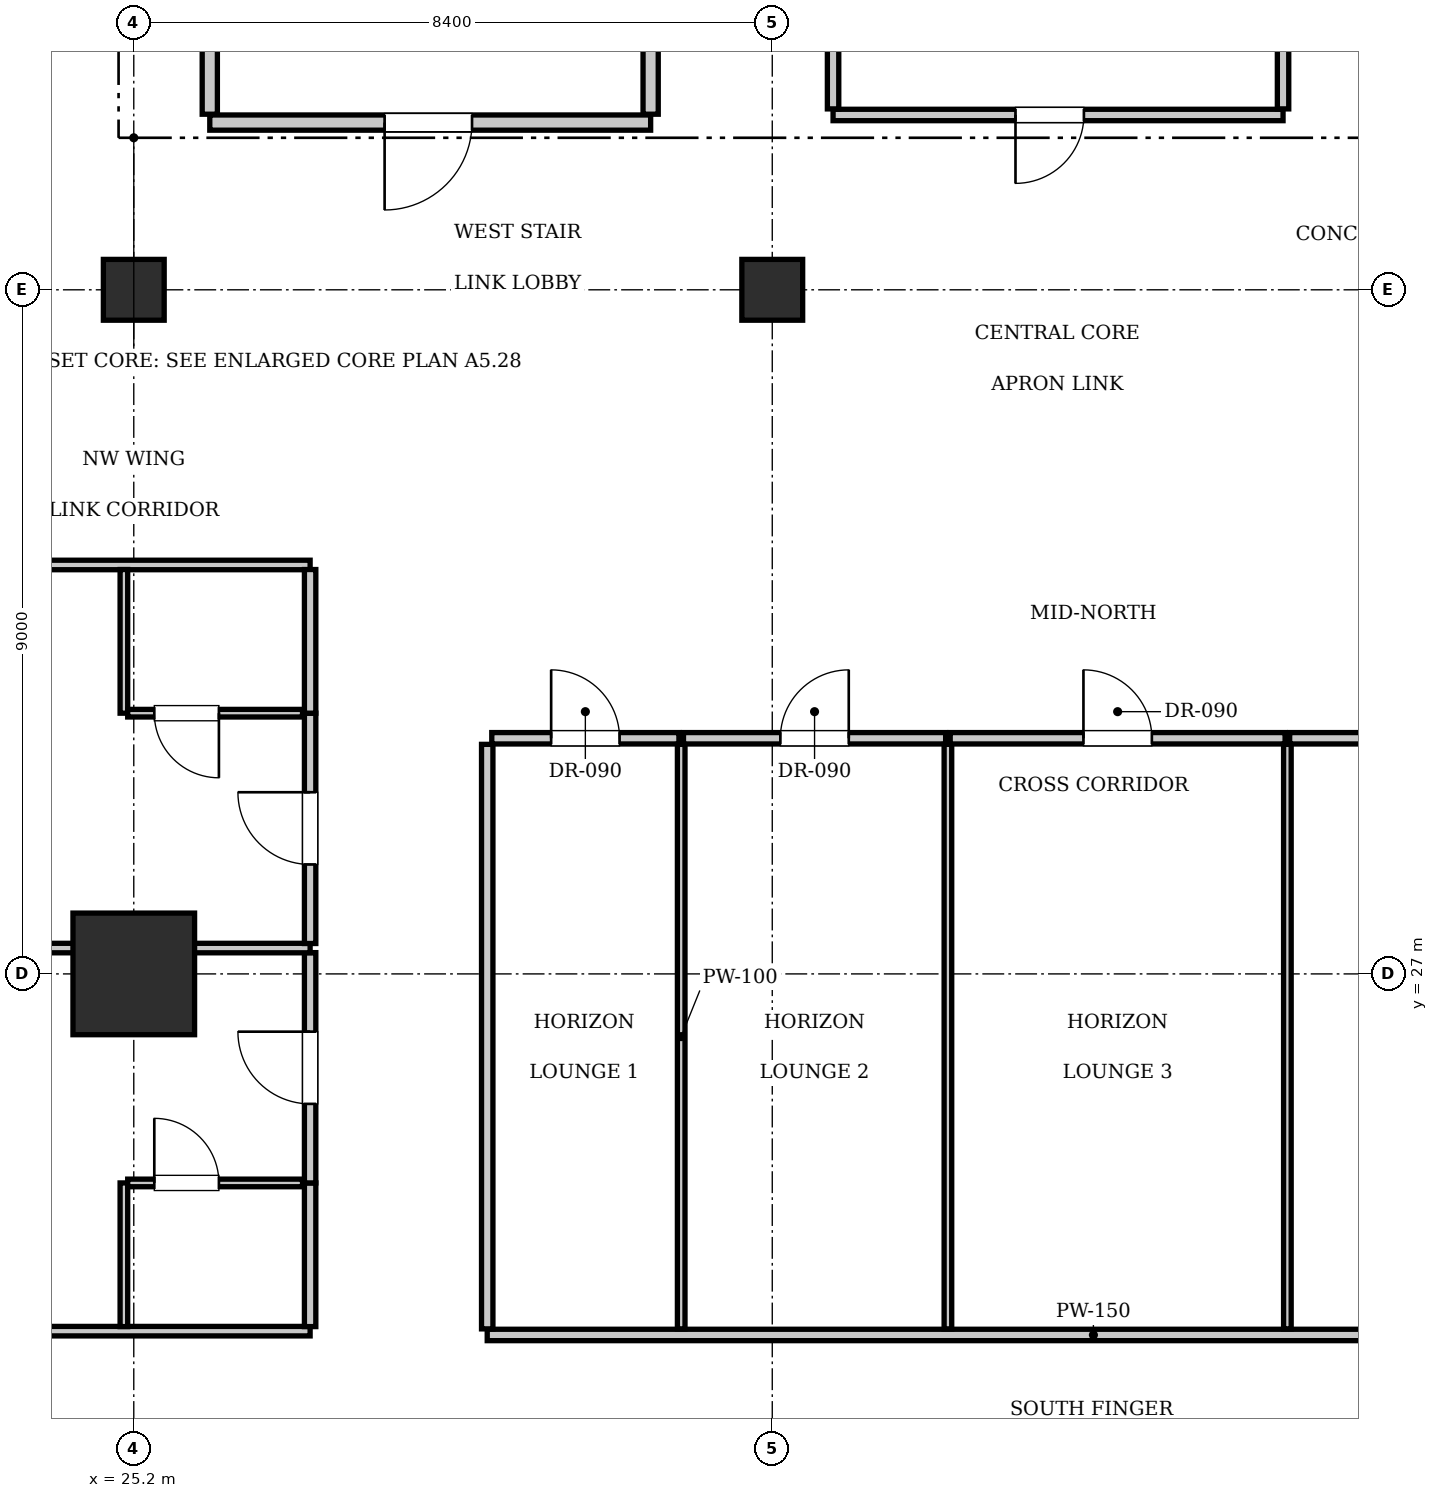
"""IFC4 building model, lengths in metres.
Left out: names, types, materials, properties, quantities, classifications, styles, units other than length and angle.
Written with IfcOpenShell. Run it as: python <this file> out.ifc"""

import sys

from ifc_helpers import new_model, si_unit, direction, frame, frame_2d, origin, origin_2d, place, context, subcontext, project, spatial, rectangle, extrude, element, fill, save


model = new_model("IFC4")
c1 = context("Model", 3, precision=1e-05, world=origin(), true_north=direction((0.0, 1.0)))
c2 = subcontext(c1, "Body", "Model", "MODEL_VIEW")
j1 = project(units=[si_unit("LENGTHUNIT", "METRE"), si_unit("PLANEANGLEUNIT", "RADIAN")], contexts=[c1])
p1 = place(None, origin())
s1 = spatial("IfcSite", under=j1, at=p1, CompositionType="ELEMENT")
p2 = place(p1, origin())
s2 = spatial("IfcBuilding", under=s1, at=p2, CompositionType="ELEMENT")
p3 = place(p2, frame((0.0, 0.0, 293.3)))
s3 = spatial("IfcBuildingStorey", under=s2, at=p3, CompositionType="ELEMENT", Elevation=293.3)
p4 = place(p3, frame((25.2, 27.0, 0.0), z_axis=(0.0, 0.0, 1.0), x_axis=(1.0, 0.0, 0.0)))
e1 = element("IfcColumn", 1, at=p4, inside=s3, PredefinedType="COLUMN", context=c2, shape_type="SweptSolid", body=[
    extrude(rectangle(XDim=1.6, YDim=1.6, at=origin_2d()), origin(), (0.0, 0.0, 1.0), 3.85),
])
for number, where, z_axis, x_axis in (
    (2, (25.2, 36.0, 0.0), (0.0, 0.0, 1.0), (1.0, 0.0, 0.0)),
    (3, (33.6, 36.0, 0.0), (0.0, 0.0, 1.0), (1.0, 0.0, 0.0)),
):
    element("IfcColumn", number, at=place(p3, frame(where, z_axis=z_axis, x_axis=x_axis)), inside=s3, PredefinedType="COLUMN", context=c2, shape_type="SweptSolid", body=[
        extrude(rectangle(XDim=0.8, YDim=0.8, at=origin_2d()), origin(), (0.0, 0.0, 1.0), 3.85),
    ])
p5 = place(p3, frame((26.2, 38.2, 0.0), z_axis=(0.0, 0.0, 1.0), x_axis=(1.0, 0.0, 0.0)))
e4 = element("IfcWall", 4, at=p5, inside=s3, PredefinedType="PARTITIONING", context=c2, shape_type="SweptSolid", body=[
    extrude(rectangle(XDim=5.8, YDim=0.2, at=frame_2d((2.9, 0.0))), origin(), (0.0, 0.0, 1.0), 3.61),
])
p6 = place(p5, frame((2.3, 0.0, 0.0)))
e5 = element("IfcOpeningElement", 5, at=p6, cuts=e4, PredefinedType="OPENING", context=c2, shape_type="SweptSolid", body=[
    extrude(rectangle(XDim=1.15, YDim=2.15, at=frame_2d((0.575, 1.075))), frame((0.0, 0.11, 0.0), z_axis=(0.0, -1.0, 0.0), x_axis=(1.0, 0.0, 0.0)), (0.0, 0.0, 1.0), 0.22),
])
for number, where, z_axis, x_axis in (
    (6, (26.2, 38.31, 0.0), (0.0, 0.0, 1.0), (0.0, 1.0, 0.0)),
    (7, (32.0, 38.31, 0.0), (0.0, 0.0, 1.0), (0.0, 1.0, 0.0)),
):
    element("IfcWall", number, at=place(p3, frame(where, z_axis=z_axis, x_axis=x_axis)), inside=s3, PredefinedType="PARTITIONING", context=c2, shape_type="SweptSolid", body=[
        extrude(rectangle(XDim=3.07, YDim=0.2, at=frame_2d((1.535, 0.0))), origin(), (0.0, 0.0, 1.0), 3.61),
    ])
p7 = place(p3, frame((34.4, 38.3, 0.0), z_axis=(0.0, 0.0, 1.0), x_axis=(1.0, 0.0, 0.0)))
e8 = element("IfcWall", 8, at=p7, inside=s3, PredefinedType="PARTITIONING", context=c2, shape_type="SweptSolid", body=[
    extrude(rectangle(XDim=5.92, YDim=0.15, at=frame_2d((2.96, 0.0))), origin(), (0.0, 0.0, 1.0), 3.61),
])
p8 = place(p7, frame((2.4, 0.0, 0.0)))
e9 = element("IfcOpeningElement", 9, at=p8, cuts=e8, PredefinedType="OPENING", context=c2, shape_type="SweptSolid", body=[
    extrude(rectangle(XDim=0.9, YDim=2.1, at=frame_2d((0.45, 1.05))), frame((0.0, 0.085, 0.0), z_axis=(0.0, -1.0, 0.0), x_axis=(1.0, 0.0, 0.0)), (0.0, 0.0, 1.0), 0.17),
])
for number, where, z_axis, x_axis in (
    (10, (34.4, 38.38, 0.0), (0.0, 0.0, 1.0), (0.0, 1.0, 0.0)),
    (11, (40.32, 38.38, 0.0), (0.0, 0.0, 1.0), (0.0, 1.0, 0.0)),
):
    element("IfcWall", number, at=place(p3, frame(where, z_axis=z_axis, x_axis=x_axis)), inside=s3, PredefinedType="PARTITIONING", context=c2, shape_type="SweptSolid", body=[
        extrude(rectangle(XDim=2.84, YDim=0.15, at=frame_2d((1.42, 0.0))), origin(), (0.0, 0.0, 1.0), 3.61),
    ])
p9 = place(p3, frame((29.85, 22.25, 0.0), z_axis=(0.0, 0.0, 1.0), x_axis=(1.0, 0.0, 0.0)))
e12 = element("IfcWall", 12, at=p9, inside=s3, PredefinedType="PARTITIONING", context=c2, shape_type="SweptSolid", body=[
    extrude(rectangle(XDim=15.95, YDim=0.15, at=frame_2d((7.975, 0.0))), origin(), (0.0, 0.0, 1.0), 3.61),
])
p10 = place(p3, frame((29.85, 22.33, 0.0), z_axis=(0.0, 0.0, 1.0), x_axis=(0.0, 1.0, 0.0)))
e13 = element("IfcWall", 13, at=p10, inside=s3, PredefinedType="PARTITIONING", context=c2, shape_type="SweptSolid", body=[
    extrude(rectangle(XDim=7.69, YDim=0.15, at=frame_2d((3.845, 0.0))), origin(), (0.0, 0.0, 1.0), 3.61),
])
p11 = place(p3, frame((29.91, 30.1, 0.0), z_axis=(0.0, 0.0, 1.0), x_axis=(1.0, 0.0, 0.0)))
e14 = element("IfcWall", 14, at=p11, inside=s3, PredefinedType="PARTITIONING", context=c2, shape_type="SweptSolid", body=[
    extrude(rectangle(XDim=2.462, YDim=0.15, at=frame_2d((1.231, 0.0))), origin(), (0.0, 0.0, 1.0), 3.61),
])
p12 = place(p11, frame((0.781, 0.0, 0.0)))
e15 = element("IfcOpeningElement", 15, at=p12, cuts=e14, PredefinedType="OPENING", context=c2, shape_type="SweptSolid", body=[
    extrude(rectangle(XDim=0.9, YDim=2.1, at=frame_2d((0.45, 1.05))), frame((0.0, 0.085, 0.0), z_axis=(0.0, -1.0, 0.0), x_axis=(1.0, 0.0, 0.0)), (0.0, 0.0, 1.0), 0.17),
])
p13 = place(p3, frame((32.402, 22.33, 0.0), z_axis=(0.0, 0.0, 1.0), x_axis=(0.0, 1.0, 0.0)))
e16 = element("IfcWall", 16, at=p13, inside=s3, PredefinedType="PARTITIONING", context=c2, shape_type="SweptSolid", body=[
    extrude(rectangle(XDim=7.69, YDim=0.1, at=frame_2d((3.845, 0.0))), origin(), (0.0, 0.0, 1.0), 3.61),
])
p14 = place(p3, frame((32.432, 30.1, 0.0), z_axis=(0.0, 0.0, 1.0), x_axis=(1.0, 0.0, 0.0)))
e17 = element("IfcWall", 17, at=p14, inside=s3, PredefinedType="PARTITIONING", context=c2, shape_type="SweptSolid", body=[
    extrude(rectangle(XDim=3.449, YDim=0.15, at=frame_2d((1.725, 0.0))), origin(), (0.0, 0.0, 1.0), 3.61),
])
p15 = place(p14, frame((1.274, 0.0, 0.0)))
e18 = element("IfcOpeningElement", 18, at=p15, cuts=e17, PredefinedType="OPENING", context=c2, shape_type="SweptSolid", body=[
    extrude(rectangle(XDim=0.9, YDim=2.1, at=frame_2d((0.45, 1.05))), frame((0.0, 0.085, 0.0), z_axis=(0.0, -1.0, 0.0), x_axis=(1.0, 0.0, 0.0)), (0.0, 0.0, 1.0), 0.17),
])
p16 = place(p3, frame((35.911, 22.33, 0.0), z_axis=(0.0, 0.0, 1.0), x_axis=(0.0, 1.0, 0.0)))
e19 = element("IfcWall", 19, at=p16, inside=s3, PredefinedType="PARTITIONING", context=c2, shape_type="SweptSolid", body=[
    extrude(rectangle(XDim=7.69, YDim=0.1, at=frame_2d((3.845, 0.0))), origin(), (0.0, 0.0, 1.0), 3.61),
])
p17 = place(p3, frame((35.941, 30.1, 0.0), z_axis=(0.0, 0.0, 1.0), x_axis=(1.0, 0.0, 0.0)))
e20 = element("IfcWall", 20, at=p17, inside=s3, PredefinedType="PARTITIONING", context=c2, shape_type="SweptSolid", body=[
    extrude(rectangle(XDim=4.406, YDim=0.15, at=frame_2d((2.203, 0.0))), origin(), (0.0, 0.0, 1.0), 3.61),
])
p18 = place(p17, frame((1.753, 0.0, 0.0)))
e21 = element("IfcOpeningElement", 21, at=p18, cuts=e20, PredefinedType="OPENING", context=c2, shape_type="SweptSolid", body=[
    extrude(rectangle(XDim=0.9, YDim=2.1, at=frame_2d((0.45, 1.05))), frame((0.0, 0.085, 0.0), z_axis=(0.0, -1.0, 0.0), x_axis=(1.0, 0.0, 0.0)), (0.0, 0.0, 1.0), 0.17),
])
p19 = place(p3, frame((40.377, 22.33, 0.0), z_axis=(0.0, 0.0, 1.0), x_axis=(0.0, 1.0, 0.0)))
e22 = element("IfcWall", 22, at=p19, inside=s3, PredefinedType="PARTITIONING", context=c2, shape_type="SweptSolid", body=[
    extrude(rectangle(XDim=7.69, YDim=0.1, at=frame_2d((3.845, 0.0))), origin(), (0.0, 0.0, 1.0), 3.61),
])
p20 = place(p3, frame((40.407, 30.1, 0.0), z_axis=(0.0, 0.0, 1.0), x_axis=(1.0, 0.0, 0.0)))
e23 = element("IfcWall", 23, at=p20, inside=s3, PredefinedType="PARTITIONING", context=c2, shape_type="SweptSolid", body=[
    extrude(rectangle(XDim=5.333, YDim=0.15, at=frame_2d((2.667, 0.0))), origin(), (0.0, 0.0, 1.0), 3.61),
])
p21 = place(p20, frame((2.217, 0.0, 0.0)))
e24 = element("IfcOpeningElement", 24, at=p21, cuts=e23, PredefinedType="OPENING", context=c2, shape_type="SweptSolid", body=[
    extrude(rectangle(XDim=0.9, YDim=2.1, at=frame_2d((0.45, 1.05))), frame((0.0, 0.085, 0.0), z_axis=(0.0, -1.0, 0.0), x_axis=(1.0, 0.0, 0.0)), (0.0, 0.0, 1.0), 0.17),
])
for number, where, z_axis, x_axis in (
    (25, (15.5, 22.3, 0.0), (0.0, 0.0, 1.0), (1.0, 0.0, 0.0)),
    (26, (15.5, 32.38, 0.0), (0.0, 0.0, 1.0), (1.0, 0.0, 0.0)),
):
    element("IfcWall", number, at=place(p3, frame(where, z_axis=z_axis, x_axis=x_axis)), inside=s3, PredefinedType="PARTITIONING", context=c2, shape_type="SweptSolid", body=[
        extrude(rectangle(XDim=12.02, YDim=0.125, at=frame_2d((6.01, 0.0))), origin(), (0.0, 0.0, 1.0), 3.61),
    ])
p22 = place(p3, frame((27.52, 22.36, 0.0), z_axis=(0.0, 0.0, 1.0), x_axis=(0.0, 1.0, 0.0)))
e27 = element("IfcWall", 27, at=p22, inside=s3, PredefinedType="PARTITIONING", context=c2, shape_type="SweptSolid", body=[
    extrude(rectangle(XDim=1.89, YDim=0.15, at=frame_2d((0.945, 0.0))), origin(), (0.0, 0.0, 1.0), 3.61),
])
p23 = place(p3, frame((27.52, 24.25, 0.0), z_axis=(0.0, 0.0, 1.0), x_axis=(0.0, 1.0, 0.0)))
e28 = element("IfcWall", 28, at=p23, inside=s3, PredefinedType="PARTITIONING", context=c2, shape_type="SweptSolid", body=[
    extrude(rectangle(XDim=3.03, YDim=0.15, at=frame_2d((1.515, 0.0))), origin(), (0.0, 0.0, 1.0), 3.61),
])
p24 = place(p23, frame((1.04, 0.0, 0.0)))
e29 = element("IfcOpeningElement", 29, at=p24, cuts=e28, PredefinedType="OPENING", context=c2, shape_type="SweptSolid", body=[
    extrude(rectangle(XDim=0.95, YDim=2.15, at=frame_2d((0.475, 1.075))), frame((0.0, 0.085, 0.0), z_axis=(0.0, -1.0, 0.0), x_axis=(1.0, 0.0, 0.0)), (0.0, 0.0, 1.0), 0.17),
])
p25 = place(p3, frame((25.07, 22.36, 0.0), z_axis=(0.0, 0.0, 1.0), x_axis=(0.0, 1.0, 0.0)))
e30 = element("IfcWall", 30, at=p25, inside=s3, PredefinedType="PARTITIONING", context=c2, shape_type="SweptSolid", body=[
    extrude(rectangle(XDim=1.89, YDim=0.1, at=frame_2d((0.945, 0.0))), origin(), (0.0, 0.0, 1.0), 3.61),
])
p26 = place(p3, frame((25.12, 24.25, 0.0), z_axis=(0.0, 0.0, 1.0), x_axis=(1.0, 0.0, 0.0)))
e31 = element("IfcWall", 31, at=p26, inside=s3, PredefinedType="PARTITIONING", context=c2, shape_type="SweptSolid", body=[
    extrude(rectangle(XDim=2.3, YDim=0.1, at=frame_2d((1.15, 0.0))), origin(), (0.0, 0.0, 1.0), 3.61),
])
p27 = place(p26, frame((0.35, 0.0, 0.0)))
e32 = element("IfcOpeningElement", 32, at=p27, cuts=e31, PredefinedType="OPENING", context=c2, shape_type="SweptSolid", body=[
    extrude(rectangle(XDim=0.85, YDim=2.1, at=frame_2d((0.425, 1.05))), frame((0.0, 0.06, 0.0), z_axis=(0.0, -1.0, 0.0), x_axis=(1.0, 0.0, 0.0)), (0.0, 0.0, 1.0), 0.12),
])
p28 = place(p3, frame((15.5, 27.34, 0.0), z_axis=(0.0, 0.0, 1.0), x_axis=(1.0, 0.0, 0.0)))
e33 = element("IfcWall", 33, at=p28, inside=s3, PredefinedType="PARTITIONING", context=c2, shape_type="SweptSolid", body=[
    extrude(rectangle(XDim=12.02, YDim=0.125, at=frame_2d((6.01, 0.0))), origin(), (0.0, 0.0, 1.0), 3.61),
])
p29 = place(p3, frame((27.52, 27.4, 0.0), z_axis=(0.0, 0.0, 1.0), x_axis=(0.0, 1.0, 0.0)))
e34 = element("IfcWall", 34, at=p29, inside=s3, PredefinedType="PARTITIONING", context=c2, shape_type="SweptSolid", body=[
    extrude(rectangle(XDim=3.03, YDim=0.15, at=frame_2d((1.515, 0.0))), origin(), (0.0, 0.0, 1.0), 3.61),
])
p30 = place(p29, frame((1.04, 0.0, 0.0)))
e35 = element("IfcOpeningElement", 35, at=p30, cuts=e34, PredefinedType="OPENING", context=c2, shape_type="SweptSolid", body=[
    extrude(rectangle(XDim=0.95, YDim=2.15, at=frame_2d((0.475, 1.075))), frame((0.0, 0.085, 0.0), z_axis=(0.0, -1.0, 0.0), x_axis=(1.0, 0.0, 0.0)), (0.0, 0.0, 1.0), 0.17),
])
p31 = place(p3, frame((27.52, 30.43, 0.0), z_axis=(0.0, 0.0, 1.0), x_axis=(0.0, 1.0, 0.0)))
e36 = element("IfcWall", 36, at=p31, inside=s3, PredefinedType="PARTITIONING", context=c2, shape_type="SweptSolid", body=[
    extrude(rectangle(XDim=1.89, YDim=0.15, at=frame_2d((0.945, 0.0))), origin(), (0.0, 0.0, 1.0), 3.61),
])
p32 = place(p3, frame((25.07, 30.43, 0.0), z_axis=(0.0, 0.0, 1.0), x_axis=(0.0, 1.0, 0.0)))
e37 = element("IfcWall", 37, at=p32, inside=s3, PredefinedType="PARTITIONING", context=c2, shape_type="SweptSolid", body=[
    extrude(rectangle(XDim=1.89, YDim=0.1, at=frame_2d((0.945, 0.0))), origin(), (0.0, 0.0, 1.0), 3.61),
])
p33 = place(p3, frame((25.12, 30.43, 0.0), z_axis=(0.0, 0.0, 1.0), x_axis=(1.0, 0.0, 0.0)))
e38 = element("IfcWall", 38, at=p33, inside=s3, PredefinedType="PARTITIONING", context=c2, shape_type="SweptSolid", body=[
    extrude(rectangle(XDim=2.3, YDim=0.1, at=frame_2d((1.15, 0.0))), origin(), (0.0, 0.0, 1.0), 3.61),
])
p34 = place(p33, frame((0.35, 0.0, 0.0)))
e39 = element("IfcOpeningElement", 39, at=p34, cuts=e38, PredefinedType="OPENING", context=c2, shape_type="SweptSolid", body=[
    extrude(rectangle(XDim=0.85, YDim=2.1, at=frame_2d((0.425, 1.05))), frame((0.0, 0.06, 0.0), z_axis=(0.0, -1.0, 0.0), x_axis=(1.0, 0.0, 0.0)), (0.0, 0.0, 1.0), 0.12),
])
p35 = place(p6, frame((1.15, 0.0, 0.0), z_axis=(0.0, 0.0, 1.0), x_axis=(-1.0, 0.0, 0.0)))
e40 = element("IfcDoor", 40, at=p35, inside=s3, OperationType="SINGLE_SWING_RIGHT", PredefinedType="DOOR", context=c2, shape_type="SweptSolid", body=[
    extrude(rectangle(XDim=1.15, YDim=2.15, at=frame_2d((0.575, 1.075))), frame((0.0, 0.025, 0.0), z_axis=(0.0, -1.0, 0.0), x_axis=(1.0, 0.0, 0.0)), (0.0, 0.0, 1.0), 0.05),
])
fill(e5, e40)
p36 = place(p8, frame((0.9, 0.0, 0.0), z_axis=(0.0, 0.0, 1.0), x_axis=(-1.0, 0.0, 0.0)))
e41 = element("IfcDoor", 41, at=p36, inside=s3, OperationType="SINGLE_SWING_RIGHT", PredefinedType="DOOR", context=c2, shape_type="SweptSolid", body=[
    extrude(rectangle(XDim=0.9, YDim=2.1, at=frame_2d((0.45, 1.05))), frame((0.0, 0.025, 0.0), z_axis=(0.0, -1.0, 0.0), x_axis=(1.0, 0.0, 0.0)), (0.0, 0.0, 1.0), 0.05),
])
fill(e9, e41)
p37 = place(p12, origin())
e42 = element("IfcDoor", 42, at=p37, inside=s3, OperationType="SINGLE_SWING_LEFT", PredefinedType="DOOR", context=c2, shape_type="SweptSolid", body=[
    extrude(rectangle(XDim=0.9, YDim=2.1, at=frame_2d((0.45, 1.05))), frame((0.0, 0.025, 0.0), z_axis=(0.0, -1.0, 0.0), x_axis=(1.0, 0.0, 0.0)), (0.0, 0.0, 1.0), 0.05),
])
fill(e15, e42)
p38 = place(p15, origin())
e43 = element("IfcDoor", 43, at=p38, inside=s3, OperationType="SINGLE_SWING_RIGHT", PredefinedType="DOOR", context=c2, shape_type="SweptSolid", body=[
    extrude(rectangle(XDim=0.9, YDim=2.1, at=frame_2d((0.45, 1.05))), frame((0.0, 0.025, 0.0), z_axis=(0.0, -1.0, 0.0), x_axis=(1.0, 0.0, 0.0)), (0.0, 0.0, 1.0), 0.05),
])
fill(e18, e43)
p39 = place(p18, origin())
e44 = element("IfcDoor", 44, at=p39, inside=s3, OperationType="SINGLE_SWING_LEFT", PredefinedType="DOOR", context=c2, shape_type="SweptSolid", body=[
    extrude(rectangle(XDim=0.9, YDim=2.1, at=frame_2d((0.45, 1.05))), frame((0.0, 0.025, 0.0), z_axis=(0.0, -1.0, 0.0), x_axis=(1.0, 0.0, 0.0)), (0.0, 0.0, 1.0), 0.05),
])
fill(e21, e44)
p40 = place(p27, origin())
e45 = element("IfcDoor", 45, at=p40, inside=s3, OperationType="SINGLE_SWING_LEFT", PredefinedType="DOOR", context=c2, shape_type="SweptSolid", body=[
    extrude(rectangle(XDim=0.85, YDim=2.1, at=frame_2d((0.425, 1.05))), frame((0.0, 0.025, 0.0), z_axis=(0.0, -1.0, 0.0), x_axis=(1.0, 0.0, 0.0)), (0.0, 0.0, 1.0), 0.05),
])
fill(e32, e45)
p41 = place(p24, origin())
e46 = element("IfcDoor", 46, at=p41, inside=s3, OperationType="SINGLE_SWING_RIGHT", PredefinedType="DOOR", context=c2, shape_type="SweptSolid", body=[
    extrude(rectangle(XDim=0.95, YDim=2.15, at=frame_2d((0.475, 1.075))), frame((0.0, 0.025, 0.0), z_axis=(0.0, -1.0, 0.0), x_axis=(1.0, 0.0, 0.0)), (0.0, 0.0, 1.0), 0.05),
])
fill(e29, e46)
p42 = place(p34, frame((0.85, 0.0, 0.0), z_axis=(0.0, 0.0, 1.0), x_axis=(-1.0, 0.0, 0.0)))
e47 = element("IfcDoor", 47, at=p42, inside=s3, OperationType="SINGLE_SWING_LEFT", PredefinedType="DOOR", context=c2, shape_type="SweptSolid", body=[
    extrude(rectangle(XDim=0.85, YDim=2.1, at=frame_2d((0.425, 1.05))), frame((0.0, 0.025, 0.0), z_axis=(0.0, -1.0, 0.0), x_axis=(1.0, 0.0, 0.0)), (0.0, 0.0, 1.0), 0.05),
])
fill(e39, e47)
p43 = place(p30, origin())
e48 = element("IfcDoor", 48, at=p43, inside=s3, OperationType="SINGLE_SWING_RIGHT", PredefinedType="DOOR", context=c2, shape_type="SweptSolid", body=[
    extrude(rectangle(XDim=0.95, YDim=2.15, at=frame_2d((0.475, 1.075))), frame((0.0, 0.025, 0.0), z_axis=(0.0, -1.0, 0.0), x_axis=(1.0, 0.0, 0.0)), (0.0, 0.0, 1.0), 0.05),
])
fill(e35, e48)
save(model, sys.argv[1])
